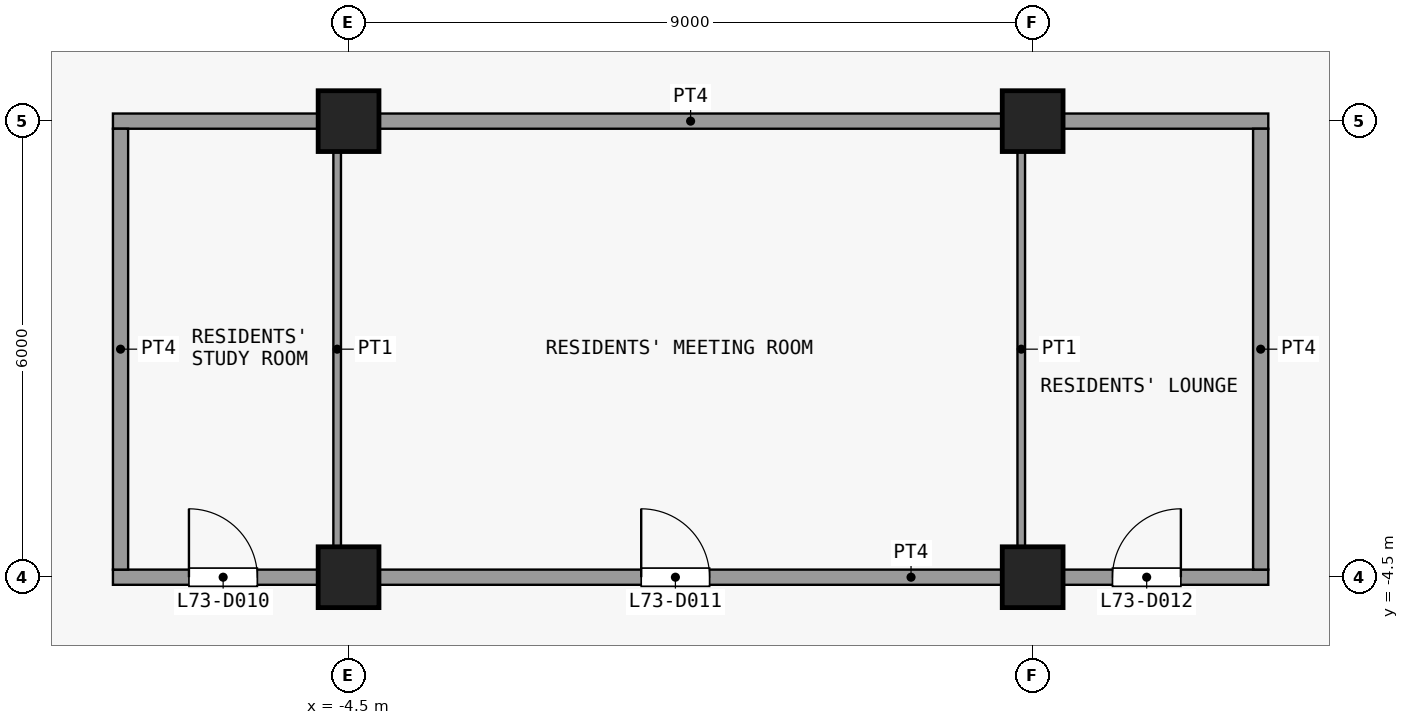
"""IFC4 building model, lengths in metres.
Left out: names, types, materials, properties, quantities, classifications, styles, units other than length and angle.
Written with IfcOpenShell. Run it as: python <this file> out.ifc"""

import sys

from ifc_helpers import new_model, si_unit, direction, frame, frame_2d, origin, origin_2d, place, context, subcontext, project, spatial, rectangle, extrude, element, fill, save


model = new_model("IFC4")
c1 = context("Model", 3, precision=1e-05, world=origin(), true_north=direction((0.0, 1.0)))
c2 = subcontext(c1, "Body", "Model", "MODEL_VIEW")
j1 = project(units=[si_unit("LENGTHUNIT", "METRE"), si_unit("PLANEANGLEUNIT", "RADIAN")], contexts=[c1])
p1 = place(None, origin())
s1 = spatial("IfcSite", under=j1, at=p1, CompositionType="ELEMENT")
p2 = place(p1, origin())
s2 = spatial("IfcBuilding", under=s1, at=p2, CompositionType="ELEMENT")
p3 = place(p2, frame((0.0, 0.0, 287.9)))
s3 = spatial("IfcBuildingStorey", under=s2, at=p3, CompositionType="ELEMENT", Elevation=287.9)
for number, where, z_axis, x_axis in (
    (1, (-4.5, -4.5, 0.0), (0.0, 0.0, 1.0), (1.0, 0.0, 0.0)),
    (2, (-4.5, 1.5, 0.0), (0.0, 0.0, 1.0), (1.0, 0.0, 0.0)),
    (3, (4.5, -4.5, 0.0), (0.0, 0.0, 1.0), (1.0, 0.0, 0.0)),
    (4, (4.5, 1.5, 0.0), (0.0, 0.0, 1.0), (1.0, 0.0, 0.0)),
):
    element("IfcColumn", number, at=place(p3, frame(where, z_axis=z_axis, x_axis=x_axis)), inside=s3, PredefinedType="COLUMN", context=c2, shape_type="SweptSolid", body=[
        extrude(rectangle(XDim=0.8, YDim=0.8, at=origin_2d()), origin(), (0.0, 0.0, 1.0), 3.6),
    ])
p4 = place(p3, frame((-7.6, -4.5, 0.0), z_axis=(0.0, 0.0, 1.0), x_axis=(1.0, 0.0, 0.0)))
e5 = element("IfcWall", 5, at=p4, inside=s3, PredefinedType="PARTITIONING", context=c2, shape_type="SweptSolid", body=[
    extrude(rectangle(XDim=15.2, YDim=0.2, at=frame_2d((7.6, 0.0))), origin(), (0.0, 0.0, 1.0), 3.3),
])
p5 = place(p4, frame((1.0, 0.0, 0.0)))
e6 = element("IfcOpeningElement", 6, at=p5, cuts=e5, PredefinedType="OPENING", context=c2, shape_type="SweptSolid", body=[
    extrude(rectangle(XDim=0.9, YDim=2.1, at=frame_2d((0.45, 1.05))), frame((0.0, 0.11, 0.0), z_axis=(0.0, -1.0, 0.0), x_axis=(1.0, 0.0, 0.0)), (0.0, 0.0, 1.0), 0.22),
])
p6 = place(p4, frame((6.95, 0.0, 0.0)))
e7 = element("IfcOpeningElement", 7, at=p6, cuts=e5, PredefinedType="OPENING", context=c2, shape_type="SweptSolid", body=[
    extrude(rectangle(XDim=0.9, YDim=2.1, at=frame_2d((0.45, 1.05))), frame((0.0, 0.11, 0.0), z_axis=(0.0, -1.0, 0.0), x_axis=(1.0, 0.0, 0.0)), (0.0, 0.0, 1.0), 0.22),
])
p7 = place(p4, frame((13.15, 0.0, 0.0)))
e8 = element("IfcOpeningElement", 8, at=p7, cuts=e5, PredefinedType="OPENING", context=c2, shape_type="SweptSolid", body=[
    extrude(rectangle(XDim=0.9, YDim=2.1, at=frame_2d((0.45, 1.05))), frame((0.0, 0.11, 0.0), z_axis=(0.0, -1.0, 0.0), x_axis=(1.0, 0.0, 0.0)), (0.0, 0.0, 1.0), 0.22),
])
p8 = place(p3, frame((-7.6, 1.5, 0.0), z_axis=(0.0, 0.0, 1.0), x_axis=(1.0, 0.0, 0.0)))
e9 = element("IfcWall", 9, at=p8, inside=s3, PredefinedType="PARTITIONING", context=c2, shape_type="SweptSolid", body=[
    extrude(rectangle(XDim=15.2, YDim=0.2, at=frame_2d((7.6, 0.0))), origin(), (0.0, 0.0, 1.0), 3.3),
])
p9 = place(p3, frame((-7.5, -4.4, 0.0), z_axis=(0.0, 0.0, 1.0), x_axis=(0.0, 1.0, 0.0)))
e10 = element("IfcWall", 10, at=p9, inside=s3, PredefinedType="PARTITIONING", context=c2, shape_type="SweptSolid", body=[
    extrude(rectangle(XDim=5.8, YDim=0.2, at=frame_2d((2.9, 0.0))), origin(), (0.0, 0.0, 1.0), 3.3),
])
for number, where, z_axis, x_axis in (
    (11, (-4.65, -4.4, 0.0), (0.0, 0.0, 1.0), (0.0, 1.0, 0.0)),
    (12, (4.35, -4.4, 0.0), (0.0, 0.0, 1.0), (0.0, 1.0, 0.0)),
):
    element("IfcWall", number, at=place(p3, frame(where, z_axis=z_axis, x_axis=x_axis)), inside=s3, PredefinedType="PARTITIONING", context=c2, shape_type="SweptSolid", body=[
        extrude(rectangle(XDim=5.8, YDim=0.1, at=frame_2d((2.9, 0.0))), origin(), (0.0, 0.0, 1.0), 3.3),
    ])
p10 = place(p3, frame((7.5, -4.4, 0.0), z_axis=(0.0, 0.0, 1.0), x_axis=(0.0, 1.0, 0.0)))
e13 = element("IfcWall", 13, at=p10, inside=s3, PredefinedType="PARTITIONING", context=c2, shape_type="SweptSolid", body=[
    extrude(rectangle(XDim=5.8, YDim=0.2, at=frame_2d((2.9, 0.0))), origin(), (0.0, 0.0, 1.0), 3.3),
])
p11 = place(p5, origin())
e14 = element("IfcDoor", 14, at=p11, inside=s3, OperationType="SINGLE_SWING_RIGHT", PredefinedType="DOOR", context=c2, shape_type="SweptSolid", body=[
    extrude(rectangle(XDim=0.9, YDim=2.1, at=frame_2d((0.45, 1.05))), frame((0.0, 0.025, 0.0), z_axis=(0.0, -1.0, 0.0), x_axis=(1.0, 0.0, 0.0)), (0.0, 0.0, 1.0), 0.05),
])
fill(e6, e14)
p12 = place(p6, origin())
e15 = element("IfcDoor", 15, at=p12, inside=s3, OperationType="SINGLE_SWING_RIGHT", PredefinedType="DOOR", context=c2, shape_type="SweptSolid", body=[
    extrude(rectangle(XDim=0.9, YDim=2.1, at=frame_2d((0.45, 1.05))), frame((0.0, 0.025, 0.0), z_axis=(0.0, -1.0, 0.0), x_axis=(1.0, 0.0, 0.0)), (0.0, 0.0, 1.0), 0.05),
])
fill(e7, e15)
p13 = place(p7, origin())
e16 = element("IfcDoor", 16, at=p13, inside=s3, OperationType="SINGLE_SWING_LEFT", PredefinedType="DOOR", context=c2, shape_type="SweptSolid", body=[
    extrude(rectangle(XDim=0.9, YDim=2.1, at=frame_2d((0.45, 1.05))), frame((0.0, 0.025, 0.0), z_axis=(0.0, -1.0, 0.0), x_axis=(1.0, 0.0, 0.0)), (0.0, 0.0, 1.0), 0.05),
])
fill(e8, e16)
save(model, sys.argv[1])
